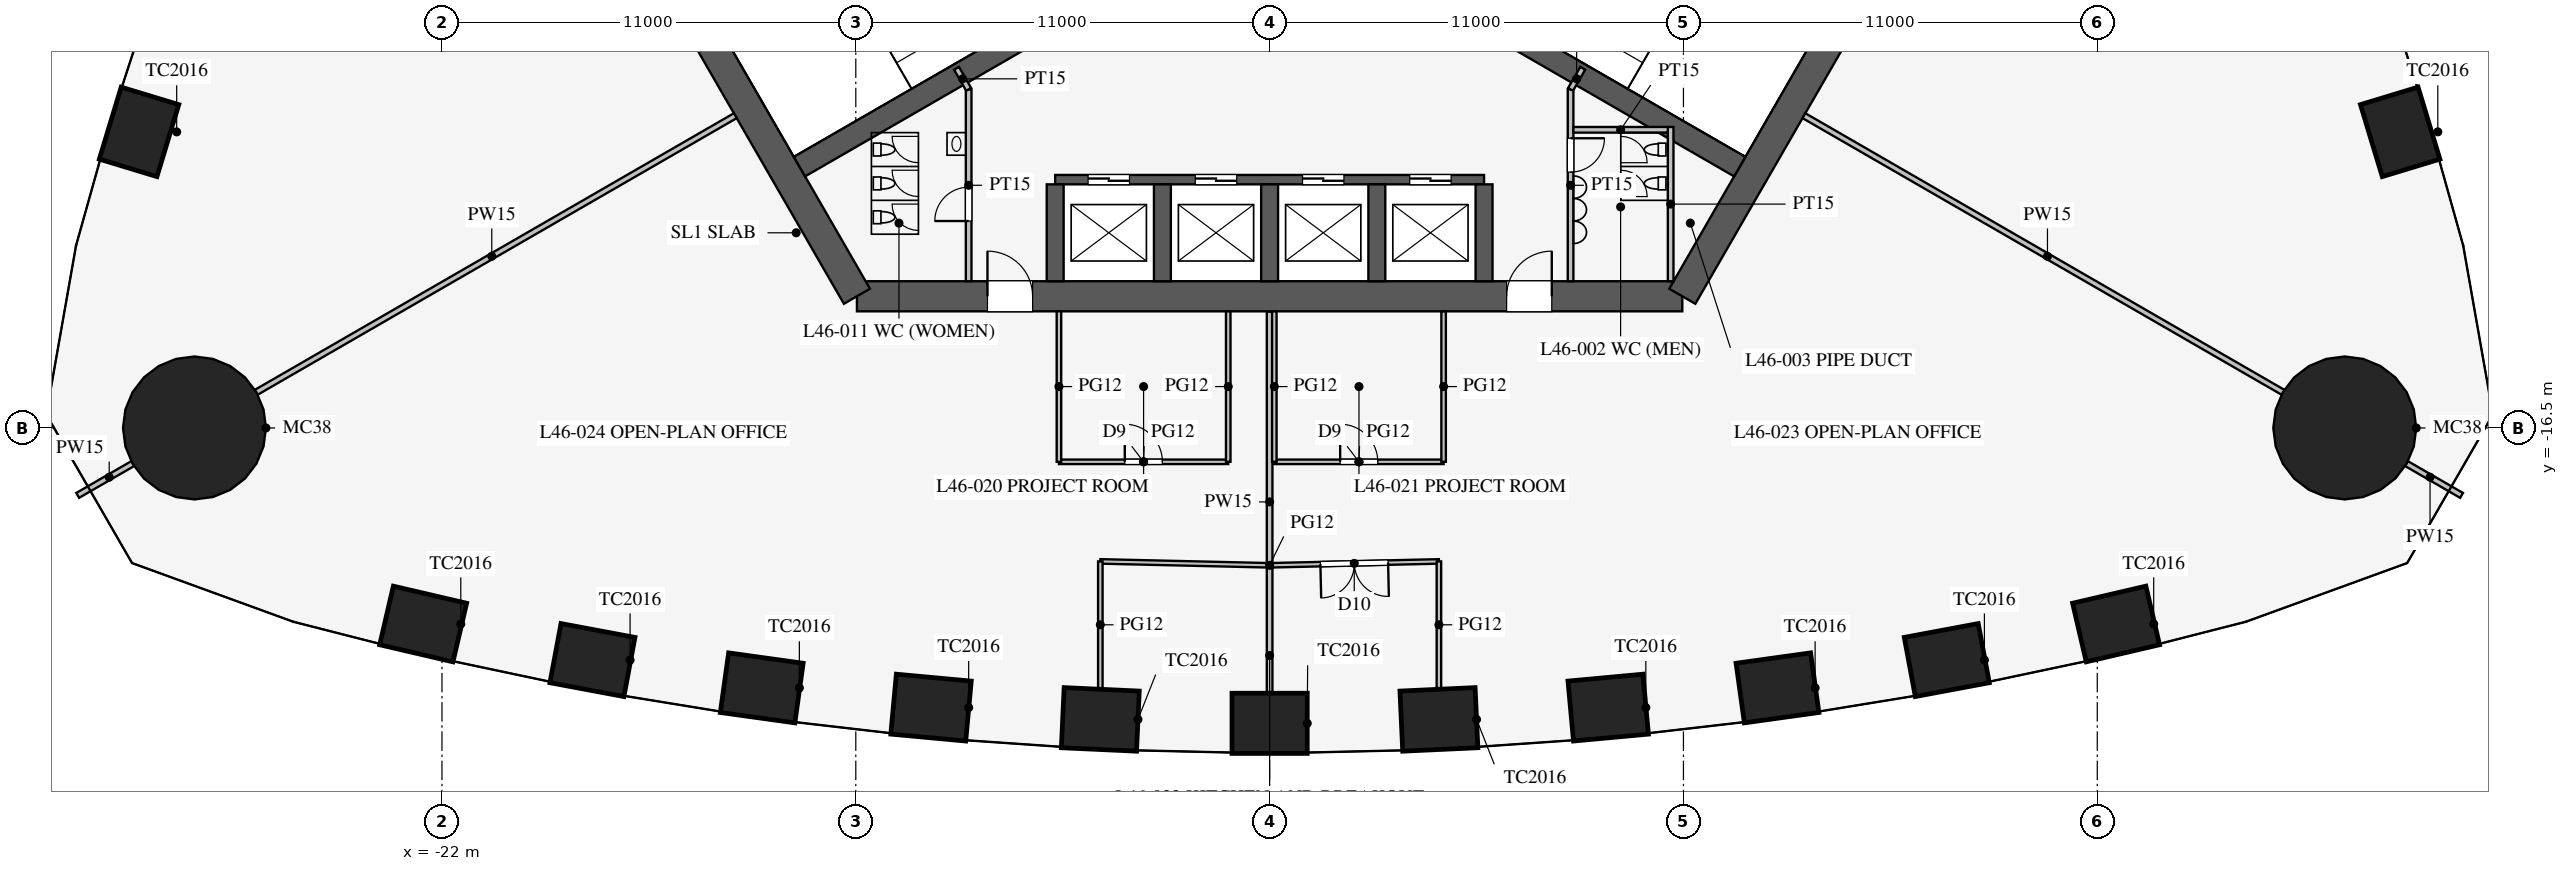
"""IFC4 building model, lengths in metres.
Left out: names, types, materials, properties, quantities, classifications, styles, units other than length and angle.
Written with IfcOpenShell. Run it as: python <this file> out.ifc"""

import sys

from ifc_helpers import new_model, si_unit, direction, frame, frame_2d, origin, origin_2d, place, context, subcontext, project, spatial, rectangle, circle, extrude, element, fill, save


model = new_model("IFC4")
c1 = context("Model", 3, precision=1e-05, world=origin(), true_north=direction((0.0, 1.0)))
c2 = subcontext(c1, "Body", "Model", "MODEL_VIEW")
j1 = project(units=[si_unit("LENGTHUNIT", "METRE"), si_unit("PLANEANGLEUNIT", "RADIAN")], contexts=[c1])
p1 = place(None, origin())
s1 = spatial("IfcSite", under=j1, at=p1, CompositionType="ELEMENT")
p2 = place(p1, origin())
s2 = spatial("IfcBuilding", under=s1, at=p2, CompositionType="ELEMENT")
p3 = place(p2, frame((0.0, 0.0, 202.3)))
s3 = spatial("IfcBuildingStorey", under=s2, at=p3, CompositionType="ELEMENT", Elevation=202.3)
for number, where, z_axis, x_axis in (
    (1, (-22.5, -21.71, 0.0), (0.0, 0.0, 1.0), (0.974, -0.227, 0.0)),
    (2, (-18.0, -22.669, 0.0), (0.0, 0.0, 1.0), (0.983, -0.184, 0.0)),
    (3, (-13.5, -23.408, 0.0), (0.0, 0.0, 1.0), (0.99, -0.138, 0.0)),
    (4, (-9.0, -23.933, 0.0), (0.0, 0.0, 1.0), (0.996, -0.092, 0.0)),
    (5, (-4.5, -24.246, 0.0), (0.0, 0.0, 1.0), (0.999, -0.046, 0.0)),
    (6, (0.0, -24.351, 0.0), (0.0, 0.0, 1.0), (1.0, 0.0, 0.0)),
    (7, (4.5, -24.246, 0.0), (0.0, 0.0, 1.0), (0.999, 0.046, 0.0)),
    (8, (9.0, -23.933, 0.0), (0.0, 0.0, 1.0), (0.996, 0.092, 0.0)),
    (9, (13.5, -23.408, 0.0), (0.0, 0.0, 1.0), (0.99, 0.138, 0.0)),
    (10, (18.0, -22.669, 0.0), (0.0, 0.0, 1.0), (0.983, 0.184, 0.0)),
    (11, (22.5, -21.71, 0.0), (0.0, 0.0, 1.0), (0.974, 0.227, 0.0)),
    (12, (30.052, -8.63, 0.0), (0.0, 0.0, 1.0), (-0.29, 0.957, 0.0)),
    (13, (-30.052, -8.63, 0.0), (0.0, 0.0, 1.0), (-0.29, -0.957, 0.0)),
):
    element("IfcColumn", number, at=place(p3, frame(where, z_axis=z_axis, x_axis=x_axis)), inside=s3, PredefinedType="COLUMN", context=c2, shape_type="SweptSolid", body=[
        extrude(rectangle(XDim=2.0, YDim=1.6, at=origin_2d()), origin(), (0.0, 0.0, 1.0), 4.2),
    ])
for number, where, z_axis, x_axis in (
    (14, (28.579, -16.5, 0.0), (0.0, 0.0, 1.0), (1.0, 0.0, 0.0)),
    (15, (-28.579, -16.5, 0.0), (0.0, 0.0, 1.0), (1.0, 0.0, 0.0)),
):
    element("IfcColumn", number, at=place(p3, frame(where, z_axis=z_axis, x_axis=x_axis)), inside=s3, PredefinedType="COLUMN", context=c2, shape_type="SweptSolid", body=[
        extrude(circle(Radius=1.9, at=origin_2d()), origin(), (0.0, 0.0, 1.0), 4.2),
    ])
p4 = place(p3, frame((-10.97, -13.0, 0.0), z_axis=(0.0, 0.0, 1.0), x_axis=(1.0, 0.0, 0.0)))
e16 = element("IfcWall", 16, at=p4, inside=s3, PredefinedType="SHEAR", context=c2, shape_type="SweptSolid", body=[
    extrude(rectangle(XDim=21.939, YDim=0.8, at=frame_2d((10.97, 0.0))), origin(), (0.0, 0.0, 1.0), 4.2),
])
p5 = place(p4, frame((17.27, 0.0, 0.0)))
e17 = element("IfcOpeningElement", 17, at=p5, cuts=e16, PredefinedType="OPENING", context=c2, shape_type="SweptSolid", body=[
    extrude(rectangle(XDim=1.2, YDim=2.1, at=frame_2d((0.6, 1.05))), frame((0.0, 0.41, 0.0), z_axis=(0.0, -1.0, 0.0), x_axis=(1.0, 0.0, 0.0)), (0.0, 0.0, 1.0), 0.82),
])
p6 = place(p4, frame((3.47, 0.0, 0.0)))
e18 = element("IfcOpeningElement", 18, at=p6, cuts=e16, PredefinedType="OPENING", context=c2, shape_type="SweptSolid", body=[
    extrude(rectangle(XDim=1.2, YDim=2.1, at=frame_2d((0.6, 1.05))), frame((0.0, 0.41, 0.0), z_axis=(0.0, -1.0, 0.0), x_axis=(1.0, 0.0, 0.0)), (0.0, 0.0, 1.0), 0.82),
])
for number, where, z_axis, x_axis in (
    (19, (10.97, -13.0, 0.0), (0.0, 0.0, 1.0), (0.5, 0.866, 0.0)),
    (20, (-16.743, -3.0, 0.0), (0.0, 0.0, 1.0), (0.5, -0.866, 0.0)),
):
    element("IfcWall", number, at=place(p3, frame(where, z_axis=z_axis, x_axis=x_axis)), inside=s3, PredefinedType="SHEAR", context=c2, shape_type="SweptSolid", body=[
        extrude(rectangle(XDim=11.547, YDim=0.8, at=frame_2d((5.773, 0.0))), origin(), (0.0, 0.0, 1.0), 4.2),
    ])
p7 = place(p3, frame((-5.7, -9.9, 0.0), z_axis=(0.0, 0.0, 1.0), x_axis=(1.0, 0.0, 0.0)))
e21 = element("IfcWall", 21, at=p7, inside=s3, PredefinedType="SHEAR", context=c2, shape_type="SweptSolid", body=[
    extrude(rectangle(XDim=11.4, YDim=0.25, at=frame_2d((5.7, 0.0))), origin(), (0.0, 0.0, 1.0), 4.2),
])
p8 = place(p7, frame((0.875, 0.0, 0.0)))
e22 = element("IfcOpeningElement", 22, at=p8, cuts=e21, PredefinedType="OPENING", context=c2, shape_type="SweptSolid", body=[
    extrude(rectangle(XDim=1.1, YDim=2.2, at=frame_2d((0.55, 1.1))), frame((0.0, 0.135, 0.0), z_axis=(0.0, -1.0, 0.0), x_axis=(1.0, 0.0, 0.0)), (0.0, 0.0, 1.0), 0.27),
])
p9 = place(p7, frame((3.725, 0.0, 0.0)))
e23 = element("IfcOpeningElement", 23, at=p9, cuts=e21, PredefinedType="OPENING", context=c2, shape_type="SweptSolid", body=[
    extrude(rectangle(XDim=1.1, YDim=2.2, at=frame_2d((0.55, 1.1))), frame((0.0, 0.135, 0.0), z_axis=(0.0, -1.0, 0.0), x_axis=(1.0, 0.0, 0.0)), (0.0, 0.0, 1.0), 0.27),
])
p10 = place(p7, frame((6.575, 0.0, 0.0)))
e24 = element("IfcOpeningElement", 24, at=p10, cuts=e21, PredefinedType="OPENING", context=c2, shape_type="SweptSolid", body=[
    extrude(rectangle(XDim=1.1, YDim=2.2, at=frame_2d((0.55, 1.1))), frame((0.0, 0.135, 0.0), z_axis=(0.0, -1.0, 0.0), x_axis=(1.0, 0.0, 0.0)), (0.0, 0.0, 1.0), 0.27),
])
p11 = place(p7, frame((9.425, 0.0, 0.0)))
e25 = element("IfcOpeningElement", 25, at=p11, cuts=e21, PredefinedType="OPENING", context=c2, shape_type="SweptSolid", body=[
    extrude(rectangle(XDim=1.1, YDim=2.2, at=frame_2d((0.55, 1.1))), frame((0.0, 0.135, 0.0), z_axis=(0.0, -1.0, 0.0), x_axis=(1.0, 0.0, 0.0)), (0.0, 0.0, 1.0), 0.27),
])
for number, where, z_axis, x_axis in (
    (26, (-5.7, -10.025, 0.0), (0.0, 0.0, 1.0), (0.0, -1.0, 0.0)),
    (27, (-2.85, -10.025, 0.0), (0.0, 0.0, 1.0), (0.0, -1.0, 0.0)),
    (28, (0.0, -10.025, 0.0), (0.0, 0.0, 1.0), (0.0, -1.0, 0.0)),
    (29, (2.85, -10.025, 0.0), (0.0, 0.0, 1.0), (0.0, -1.0, 0.0)),
    (30, (5.7, -10.025, 0.0), (0.0, 0.0, 1.0), (0.0, -1.0, 0.0)),
):
    element("IfcWall", number, at=place(p3, frame(where, z_axis=z_axis, x_axis=x_axis)), inside=s3, PredefinedType="SHEAR", context=c2, shape_type="SweptSolid", body=[
        extrude(rectangle(XDim=2.575, YDim=0.45, at=frame_2d((1.288, 0.0))), origin(), (0.0, 0.0, 1.0), 4.2),
    ])
for number, where, z_axis, x_axis in (
    (31, (4.638, -5.016, 0.0), (0.0, 0.0, 1.0), (0.866, -0.5, 0.0)),
    (32, (-4.638, -5.016, 0.0), (0.0, 0.0, 1.0), (-0.866, -0.5, 0.0)),
):
    element("IfcWall", number, at=place(p3, frame(where, z_axis=z_axis, x_axis=x_axis)), inside=s3, PredefinedType="SHEAR", context=c2, shape_type="SweptSolid", body=[
        extrude(rectangle(XDim=9.075, YDim=0.6, at=frame_2d((4.538, 0.0))), origin(), (0.0, 0.0, 1.0), 4.2),
    ])
p12 = place(p3, frame((8.0, -7.5, 0.0), z_axis=(0.0, 0.0, 1.0), x_axis=(0.0, -1.0, 0.0)))
e33 = element("IfcWall", 33, at=p12, inside=s3, PredefinedType="PARTITIONING", context=c2, shape_type="SweptSolid", body=[
    extrude(rectangle(XDim=5.1, YDim=0.15, at=frame_2d((2.55, 0.0))), origin(), (0.0, 0.0, 1.0), 4.0),
])
p13 = place(p12, frame((1.3, 0.0, 0.0)))
e34 = element("IfcOpeningElement", 34, at=p13, cuts=e33, PredefinedType="OPENING", context=c2, shape_type="SweptSolid", body=[
    extrude(rectangle(XDim=0.9, YDim=2.1, at=frame_2d((0.45, 1.05))), frame((0.0, 0.085, 0.0), z_axis=(0.0, -1.0, 0.0), x_axis=(1.0, 0.0, 0.0)), (0.0, 0.0, 1.0), 0.17),
])
p14 = place(p3, frame((-8.0, -7.5, 0.0), z_axis=(0.0, 0.0, 1.0), x_axis=(0.0, -1.0, 0.0)))
e35 = element("IfcWall", 35, at=p14, inside=s3, PredefinedType="PARTITIONING", context=c2, shape_type="SweptSolid", body=[
    extrude(rectangle(XDim=5.1, YDim=0.15, at=frame_2d((2.55, 0.0))), origin(), (0.0, 0.0, 1.0), 4.0),
])
p15 = place(p14, frame((2.6, 0.0, 0.0)))
e36 = element("IfcOpeningElement", 36, at=p15, cuts=e35, PredefinedType="OPENING", context=c2, shape_type="SweptSolid", body=[
    extrude(rectangle(XDim=0.9, YDim=2.1, at=frame_2d((0.45, 1.05))), frame((0.0, 0.085, 0.0), z_axis=(0.0, -1.0, 0.0), x_axis=(1.0, 0.0, 0.0)), (0.0, 0.0, 1.0), 0.17),
])
for number, where, z_axis, x_axis in (
    (37, (8.0, -7.5, 0.0), (0.0, 0.0, 1.0), (0.5, 0.866, 0.0)),
    (38, (-8.0, -7.5, 0.0), (0.0, 0.0, 1.0), (-0.5, 0.866, 0.0)),
):
    element("IfcWall", number, at=place(p3, frame(where, z_axis=z_axis, x_axis=x_axis)), inside=s3, PredefinedType="PARTITIONING", context=c2, shape_type="SweptSolid", body=[
        extrude(rectangle(XDim=0.645, YDim=0.15, at=frame_2d((0.323, 0.0))), origin(), (0.0, 0.0, 1.0), 4.0),
    ])
p16 = place(p3, frame((10.66, -8.5, 0.0), z_axis=(0.0, 0.0, 1.0), x_axis=(0.0, -1.0, 0.0)))
e39 = element("IfcWall", 39, at=p16, inside=s3, PredefinedType="PARTITIONING", context=c2, shape_type="SweptSolid", body=[
    extrude(rectangle(XDim=4.1, YDim=0.15, at=frame_2d((2.05, 0.0))), origin(), (0.0, 0.0, 1.0), 4.0),
])
p17 = place(p3, frame((8.075, -8.575, 0.0), z_axis=(0.0, 0.0, 1.0), x_axis=(1.0, 0.0, 0.0)))
e40 = element("IfcWall", 40, at=p17, inside=s3, PredefinedType="PARTITIONING", context=c2, shape_type="SweptSolid", body=[
    extrude(rectangle(XDim=2.51, YDim=0.15, at=frame_2d((1.255, 0.0))), origin(), (0.0, 0.0, 1.0), 4.0),
])
p18 = place(p3, frame((14.203, -8.2, 0.0), z_axis=(0.0, 0.0, 1.0), x_axis=(0.866021600284, -0.500006587798, 0.0)))
e41 = element("IfcWall", 41, at=p18, inside=s3, PredefinedType="PARTITIONING", context=c2, shape_type="SweptSolid", body=[
    extrude(rectangle(XDim=14.95, YDim=0.15, at=frame_2d((7.475, 0.0))), origin(), (0.0, 0.0, 1.0), 2.4),
])
p19 = place(p3, frame((30.008, -17.325, 0.0), z_axis=(0.0, 0.0, 1.0), x_axis=(0.866013246922, -0.500021055713, 0.0)))
e42 = element("IfcWall", 42, at=p19, inside=s3, PredefinedType="PARTITIONING", context=c2, shape_type="SweptSolid", body=[
    extrude(rectangle(XDim=1.935, YDim=0.15, at=frame_2d((0.967, 0.0))), origin(), (0.0, 0.0, 1.0), 2.4),
])
p20 = place(p3, frame((-14.203, -8.2, 0.0), z_axis=(0.0, 0.0, 1.0), x_axis=(-0.866021600284, -0.500006587798, 0.0)))
e43 = element("IfcWall", 43, at=p20, inside=s3, PredefinedType="PARTITIONING", context=c2, shape_type="SweptSolid", body=[
    extrude(rectangle(XDim=14.95, YDim=0.15, at=frame_2d((7.475, 0.0))), origin(), (0.0, 0.0, 1.0), 2.4),
])
p21 = place(p3, frame((-30.008, -17.325, 0.0), z_axis=(0.0, 0.0, 1.0), x_axis=(-0.866013246922, -0.500021055713, 0.0)))
e44 = element("IfcWall", 44, at=p21, inside=s3, PredefinedType="PARTITIONING", context=c2, shape_type="SweptSolid", body=[
    extrude(rectangle(XDim=1.935, YDim=0.15, at=frame_2d((0.967, 0.0))), origin(), (0.0, 0.0, 1.0), 2.4),
])
p22 = place(p3, frame((0.0, -13.41, 0.0), z_axis=(0.0, 0.0, 1.0), x_axis=(0.0, -1.0, 0.0)))
e45 = element("IfcWall", 45, at=p22, inside=s3, PredefinedType="PARTITIONING", context=c2, shape_type="SweptSolid", body=[
    extrude(rectangle(XDim=10.111, YDim=0.15, at=frame_2d((5.055, 0.0))), origin(), (0.0, 0.0, 1.0), 3.3),
])
p23 = place(p3, frame((0.125, -17.4, 0.0), z_axis=(0.0, 0.0, 1.0), x_axis=(1.0, 0.0, 0.0)))
e46 = element("IfcWall", 46, at=p23, inside=s3, PredefinedType="PARTITIONING", context=c2, shape_type="SweptSolid", body=[
    extrude(rectangle(XDim=4.5, YDim=0.12, at=frame_2d((2.25, 0.0))), origin(), (0.0, 0.0, 1.0), 2.9),
])
p24 = place(p23, frame((1.75, 0.0, 0.15)))
e47 = element("IfcOpeningElement", 47, at=p24, cuts=e46, PredefinedType="OPENING", context=c2, shape_type="SweptSolid", body=[
    extrude(rectangle(XDim=1.0, YDim=2.1, at=frame_2d((0.5, 1.05))), frame((0.0, 0.07, 0.0), z_axis=(0.0, -1.0, 0.0), x_axis=(1.0, 0.0, 0.0)), (0.0, 0.0, 1.0), 0.14),
])
p25 = place(p3, frame((-5.6, -17.4, 0.0), z_axis=(0.0, 0.0, 1.0), x_axis=(1.0, 0.0, 0.0)))
e48 = element("IfcWall", 48, at=p25, inside=s3, PredefinedType="PARTITIONING", context=c2, shape_type="SweptSolid", body=[
    extrude(rectangle(XDim=4.5, YDim=0.12, at=frame_2d((2.25, 0.0))), origin(), (0.0, 0.0, 1.0), 2.9),
])
p26 = place(p25, frame((1.75, 0.0, 0.15)))
e49 = element("IfcOpeningElement", 49, at=p26, cuts=e48, PredefinedType="OPENING", context=c2, shape_type="SweptSolid", body=[
    extrude(rectangle(XDim=1.0, YDim=2.1, at=frame_2d((0.5, 1.05))), frame((0.0, 0.07, 0.0), z_axis=(0.0, -1.0, 0.0), x_axis=(1.0, 0.0, 0.0)), (0.0, 0.0, 1.0), 0.14),
])
for number, where, z_axis, x_axis in (
    (50, (0.125, -13.4, 0.0), (0.0, 0.0, 1.0), (0.0, -1.0, 0.0)),
    (51, (4.625, -13.4, 0.0), (0.0, 0.0, 1.0), (0.0, -1.0, 0.0)),
    (52, (-1.1, -13.4, 0.0), (0.0, 0.0, 1.0), (0.0, -1.0, 0.0)),
    (53, (-5.6, -13.4, 0.0), (0.0, 0.0, 1.0), (0.0, -1.0, 0.0)),
):
    element("IfcWall", number, at=place(p3, frame(where, z_axis=z_axis, x_axis=x_axis)), inside=s3, PredefinedType="PARTITIONING", context=c2, shape_type="SweptSolid", body=[
        extrude(rectangle(XDim=4.0, YDim=0.12, at=frame_2d((2.0, 0.0))), origin(), (0.0, 0.0, 1.0), 2.9),
    ])
p27 = place(p3, frame((0.0, -20.151, 0.0), z_axis=(0.0, 0.0, 1.0), x_axis=(0.99973552509, 0.022997388381, 0.0)))
e54 = element("IfcWall", 54, at=p27, inside=s3, PredefinedType="PARTITIONING", context=c2, shape_type="SweptSolid", body=[
    extrude(rectangle(XDim=4.501, YDim=0.12, at=frame_2d((2.25, 0.0))), origin(), (0.0, 0.0, 1.0), 2.9),
])
p28 = place(p27, frame((1.35, 0.0, 0.15)))
e55 = element("IfcOpeningElement", 55, at=p28, cuts=e54, PredefinedType="OPENING", context=c2, shape_type="SweptSolid", body=[
    extrude(rectangle(XDim=1.8, YDim=2.1, at=frame_2d((0.9, 1.05))), frame((0.0, 0.07, 0.0), z_axis=(0.0, -1.0, 0.0), x_axis=(1.0, 0.0, 0.0)), (0.0, 0.0, 1.0), 0.14),
])
p29 = place(p3, frame((-4.5, -20.047, 0.0), z_axis=(0.0, 0.0, 1.0), x_axis=(0.99973552509, -0.022997388381, 0.0)))
e56 = element("IfcWall", 56, at=p29, inside=s3, PredefinedType="PARTITIONING", context=c2, shape_type="SweptSolid", body=[
    extrude(rectangle(XDim=4.501, YDim=0.12, at=frame_2d((2.25, 0.0))), origin(), (0.0, 0.0, 1.0), 2.9),
])
for number, where, z_axis, x_axis in (
    (57, (4.5, -20.047, 0.0), (0.0, 0.0, 1.0), (0.0, -1.0, 0.0)),
    (58, (-4.5, -20.047, 0.0), (0.0, 0.0, 1.0), (0.0, -1.0, 0.0)),
):
    element("IfcWall", number, at=place(p3, frame(where, z_axis=z_axis, x_axis=x_axis)), inside=s3, PredefinedType="PARTITIONING", context=c2, shape_type="SweptSolid", body=[
        extrude(rectangle(XDim=3.368, YDim=0.12, at=frame_2d((1.684, 0.0))), origin(), (0.0, 0.0, 1.0), 2.9),
    ])
p30 = place(p13, origin())
e59 = element("IfcDoor", 59, at=p30, inside=s3, OperationType="SINGLE_SWING_LEFT", PredefinedType="DOOR", context=c2, shape_type="SweptSolid", body=[
    extrude(rectangle(XDim=0.9, YDim=2.1, at=frame_2d((0.45, 1.05))), frame((0.0, 0.025, 0.0), z_axis=(0.0, -1.0, 0.0), x_axis=(1.0, 0.0, 0.0)), (0.0, 0.0, 1.0), 0.05),
])
fill(e34, e59)
p31 = place(p15, frame((0.9, 0.0, 0.0), z_axis=(0.0, 0.0, 1.0), x_axis=(-1.0, 0.0, 0.0)))
e60 = element("IfcDoor", 60, at=p31, inside=s3, OperationType="SINGLE_SWING_LEFT", PredefinedType="DOOR", context=c2, shape_type="SweptSolid", body=[
    extrude(rectangle(XDim=0.9, YDim=2.1, at=frame_2d((0.45, 1.05))), frame((0.0, 0.025, 0.0), z_axis=(0.0, -1.0, 0.0), x_axis=(1.0, 0.0, 0.0)), (0.0, 0.0, 1.0), 0.05),
])
fill(e36, e60)
p32 = place(p5, origin())
e61 = element("IfcDoor", 61, at=p32, inside=s3, OperationType="SINGLE_SWING_RIGHT", PredefinedType="DOOR", context=c2, shape_type="SweptSolid", body=[
    extrude(rectangle(XDim=1.2, YDim=2.1, at=frame_2d((0.6, 1.05))), frame((0.0, 0.025, 0.0), z_axis=(0.0, -1.0, 0.0), x_axis=(1.0, 0.0, 0.0)), (0.0, 0.0, 1.0), 0.05),
])
fill(e17, e61)
p33 = place(p6, origin())
e62 = element("IfcDoor", 62, at=p33, inside=s3, OperationType="SINGLE_SWING_LEFT", PredefinedType="DOOR", context=c2, shape_type="SweptSolid", body=[
    extrude(rectangle(XDim=1.2, YDim=2.1, at=frame_2d((0.6, 1.05))), frame((0.0, 0.025, 0.0), z_axis=(0.0, -1.0, 0.0), x_axis=(1.0, 0.0, 0.0)), (0.0, 0.0, 1.0), 0.05),
])
fill(e18, e62)
p34 = place(p26, origin())
e63 = element("IfcDoor", 63, at=p34, inside=s3, OperationType="SINGLE_SWING_LEFT", PredefinedType="DOOR", context=c2, shape_type="SweptSolid", body=[
    extrude(rectangle(XDim=1.0, YDim=2.1, at=frame_2d((0.5, 1.05))), frame((0.0, 0.025, 0.0), z_axis=(0.0, -1.0, 0.0), x_axis=(1.0, 0.0, 0.0)), (0.0, 0.0, 1.0), 0.05),
])
fill(e49, e63)
p35 = place(p24, origin())
e64 = element("IfcDoor", 64, at=p35, inside=s3, OperationType="SINGLE_SWING_LEFT", PredefinedType="DOOR", context=c2, shape_type="SweptSolid", body=[
    extrude(rectangle(XDim=1.0, YDim=2.1, at=frame_2d((0.5, 1.05))), frame((0.0, 0.025, 0.0), z_axis=(0.0, -1.0, 0.0), x_axis=(1.0, 0.0, 0.0)), (0.0, 0.0, 1.0), 0.05),
])
fill(e47, e64)
p36 = place(p28, frame((1.8, 0.0, 0.0), z_axis=(0.0, 0.0, 1.0), x_axis=(-1.0, 0.0, 0.0)))
e65 = element("IfcDoor", 65, at=p36, inside=s3, OperationType="DOUBLE_DOOR_SINGLE_SWING", PredefinedType="DOOR", context=c2, shape_type="SweptSolid", body=[
    extrude(rectangle(XDim=1.8, YDim=2.1, at=frame_2d((0.9, 1.05))), frame((0.0, 0.025, 0.0), z_axis=(0.0, -1.0, 0.0), x_axis=(1.0, 0.0, 0.0)), (0.0, 0.0, 1.0), 0.05),
])
fill(e55, e65)
p37 = place(p8, origin())
e66 = element("IfcDoor", 66, at=p37, inside=s3, OperationType="DOUBLE_DOOR_SLIDING", PredefinedType="DOOR", context=c2, shape_type="SweptSolid", body=[
    extrude(rectangle(XDim=1.1, YDim=2.2, at=frame_2d((0.55, 1.1))), frame((0.0, 0.025, 0.0), z_axis=(0.0, -1.0, 0.0), x_axis=(1.0, 0.0, 0.0)), (0.0, 0.0, 1.0), 0.05),
])
fill(e22, e66)
p38 = place(p9, origin())
e67 = element("IfcDoor", 67, at=p38, inside=s3, OperationType="DOUBLE_DOOR_SLIDING", PredefinedType="DOOR", context=c2, shape_type="SweptSolid", body=[
    extrude(rectangle(XDim=1.1, YDim=2.2, at=frame_2d((0.55, 1.1))), frame((0.0, 0.025, 0.0), z_axis=(0.0, -1.0, 0.0), x_axis=(1.0, 0.0, 0.0)), (0.0, 0.0, 1.0), 0.05),
])
fill(e23, e67)
p39 = place(p10, origin())
e68 = element("IfcDoor", 68, at=p39, inside=s3, OperationType="DOUBLE_DOOR_SLIDING", PredefinedType="DOOR", context=c2, shape_type="SweptSolid", body=[
    extrude(rectangle(XDim=1.1, YDim=2.2, at=frame_2d((0.55, 1.1))), frame((0.0, 0.025, 0.0), z_axis=(0.0, -1.0, 0.0), x_axis=(1.0, 0.0, 0.0)), (0.0, 0.0, 1.0), 0.05),
])
fill(e24, e68)
p40 = place(p11, origin())
e69 = element("IfcDoor", 69, at=p40, inside=s3, OperationType="DOUBLE_DOOR_SLIDING", PredefinedType="DOOR", context=c2, shape_type="SweptSolid", body=[
    extrude(rectangle(XDim=1.1, YDim=2.2, at=frame_2d((0.55, 1.1))), frame((0.0, 0.025, 0.0), z_axis=(0.0, -1.0, 0.0), x_axis=(1.0, 0.0, 0.0)), (0.0, 0.0, 1.0), 0.05),
])
fill(e25, e69)
save(model, sys.argv[1])
